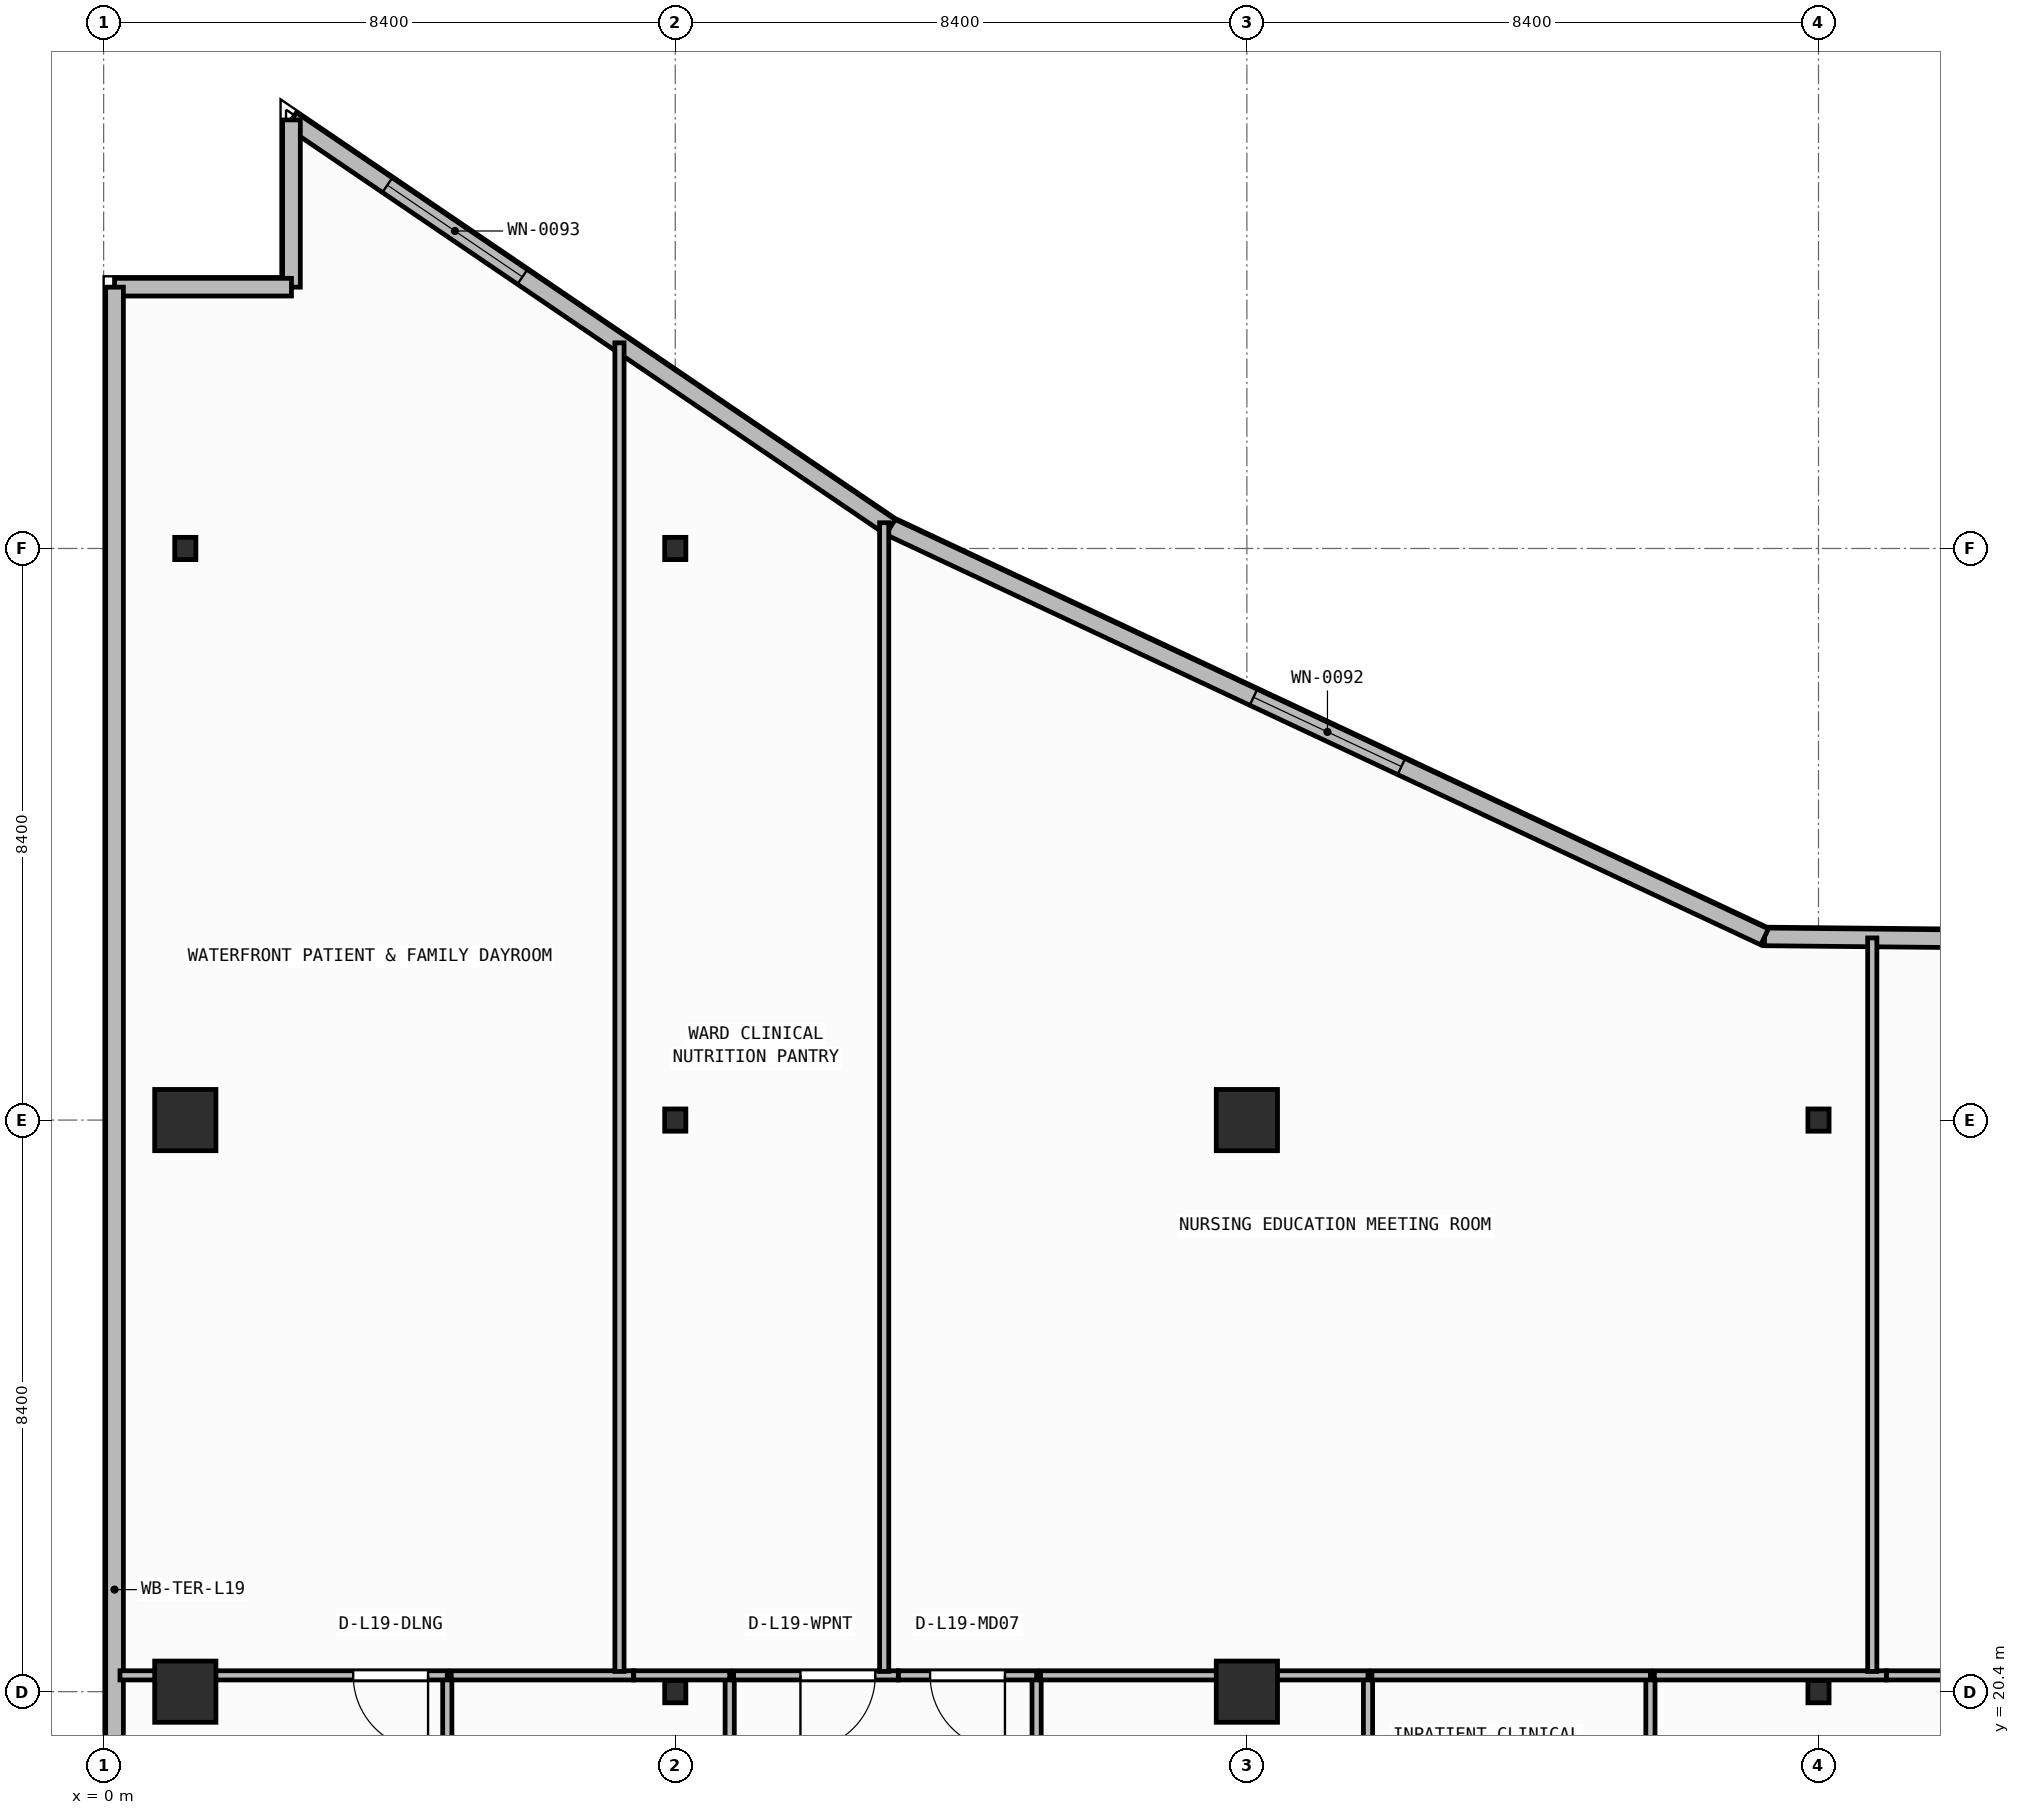
"""IFC4 building model, lengths in metres.
Left out: names, types, materials, properties, quantities, classifications, styles, units other than length and angle.
Written with IfcOpenShell. Run it as: python <this file> out.ifc"""

import sys

from ifc_helpers import new_model, si_unit, direction, frame, frame_2d, origin, origin_2d, place, context, subcontext, project, spatial, rectangle, i_section, extrude, element, fill, save


model = new_model("IFC4")
c1 = context("Model", 3, precision=1e-05, world=origin(), true_north=direction((0.0, 1.0)))
c2 = subcontext(c1, "Body", "Model", "MODEL_VIEW")
j1 = project(units=[si_unit("LENGTHUNIT", "METRE"), si_unit("PLANEANGLEUNIT", "RADIAN")], contexts=[c1])
p1 = place(None, origin())
s1 = spatial("IfcSite", under=j1, at=p1, CompositionType="ELEMENT")
p2 = place(p1, origin())
s2 = spatial("IfcBuilding", under=s1, at=p2, CompositionType="ELEMENT")
p3 = place(p2, frame((0.0, 0.0, 77.8)))
s3 = spatial("IfcBuildingStorey", under=s2, at=p3, CompositionType="ELEMENT", Elevation=77.8)
p4 = place(p3, frame((1.2, 20.4, 0.0), z_axis=(0.0, 0.0, 1.0), x_axis=(1.0, 0.0, 0.0)))
e1 = element("IfcColumn", 1, at=p4, inside=s3, PredefinedType="COLUMN", context=c2, shape_type="SweptSolid", body=[
    extrude(rectangle(XDim=0.9, YDim=0.9, at=origin_2d()), origin(), (0.0, 0.0, 1.0), 3.95),
])
p5 = place(p3, frame((8.4, 20.4, 0.0), z_axis=(0.0, 0.0, 1.0), x_axis=(1.0, 0.0, 0.0)))
e2 = element("IfcColumn", 2, at=p5, inside=s3, PredefinedType="COLUMN", context=c2, shape_type="SweptSolid", body=[
    extrude(i_section(OverallWidth=0.311, OverallDepth=0.327, WebThickness=0.016, FlangeThickness=0.025, FilletRadius=0.017, at=origin_2d()), origin(), (0.0, 0.0, 1.0), 3.95),
])
p6 = place(p3, frame((16.8, 20.4, 0.0), z_axis=(0.0, 0.0, 1.0), x_axis=(1.0, 0.0, 0.0)))
e3 = element("IfcColumn", 3, at=p6, inside=s3, PredefinedType="COLUMN", context=c2, shape_type="SweptSolid", body=[
    extrude(rectangle(XDim=0.9, YDim=0.9, at=origin_2d()), origin(), (0.0, 0.0, 1.0), 3.95),
])
p7 = place(p3, frame((25.2, 20.4, 0.0), z_axis=(0.0, 0.0, 1.0), x_axis=(1.0, 0.0, 0.0)))
e4 = element("IfcColumn", 4, at=p7, inside=s3, PredefinedType="COLUMN", context=c2, shape_type="SweptSolid", body=[
    extrude(i_section(OverallWidth=0.311, OverallDepth=0.327, WebThickness=0.016, FlangeThickness=0.025, FilletRadius=0.017, at=origin_2d()), origin(), (0.0, 0.0, 1.0), 3.95),
])
p8 = place(p3, frame((1.2, 28.8, 0.0), z_axis=(0.0, 0.0, 1.0), x_axis=(1.0, 0.0, 0.0)))
e5 = element("IfcColumn", 5, at=p8, inside=s3, PredefinedType="COLUMN", context=c2, shape_type="SweptSolid", body=[
    extrude(rectangle(XDim=0.9, YDim=0.9, at=origin_2d()), origin(), (0.0, 0.0, 1.0), 3.95),
])
p9 = place(p3, frame((8.4, 28.8, 0.0), z_axis=(0.0, 0.0, 1.0), x_axis=(1.0, 0.0, 0.0)))
e6 = element("IfcColumn", 6, at=p9, inside=s3, PredefinedType="COLUMN", context=c2, shape_type="SweptSolid", body=[
    extrude(i_section(OverallWidth=0.311, OverallDepth=0.327, WebThickness=0.016, FlangeThickness=0.025, FilletRadius=0.017, at=origin_2d()), origin(), (0.0, 0.0, 1.0), 3.95),
])
p10 = place(p3, frame((16.8, 28.8, 0.0), z_axis=(0.0, 0.0, 1.0), x_axis=(1.0, 0.0, 0.0)))
e7 = element("IfcColumn", 7, at=p10, inside=s3, PredefinedType="COLUMN", context=c2, shape_type="SweptSolid", body=[
    extrude(rectangle(XDim=0.9, YDim=0.9, at=origin_2d()), origin(), (0.0, 0.0, 1.0), 3.95),
])
for number, where, z_axis, x_axis in (
    (8, (25.2, 28.8, 0.0), (0.0, 0.0, 1.0), (1.0, 0.0, 0.0)),
    (9, (1.2, 37.2, 0.0), (0.0, 0.0, 1.0), (1.0, 0.0, 0.0)),
    (10, (8.4, 37.2, 0.0), (0.0, 0.0, 1.0), (1.0, 0.0, 0.0)),
):
    element("IfcColumn", number, at=place(p3, frame(where, z_axis=z_axis, x_axis=x_axis)), inside=s3, PredefinedType="COLUMN", context=c2, shape_type="SweptSolid", body=[
        extrude(i_section(OverallWidth=0.311, OverallDepth=0.327, WebThickness=0.016, FlangeThickness=0.025, FilletRadius=0.017, at=origin_2d()), origin(), (0.0, 0.0, 1.0), 3.95),
    ])
p11 = place(p3, frame((39.59, 31.344, 0.0), z_axis=(0.0, 0.0, 1.0), x_axis=(-0.999952362926, 0.009760731435, 0.0)))
e11 = element("IfcWall", 11, at=p11, inside=s3, PredefinedType="STANDARD", context=c2, shape_type="SweptSolid", body=[
    extrude(rectangle(XDim=15.183, YDim=0.26, at=frame_2d((7.591, 0.0))), origin(), (0.0, 0.0, 1.0), 3.71),
])
p12 = place(p11, frame((6.391, 0.0, 0.9)))
e12 = element("IfcOpeningElement", 12, at=p12, cuts=e11, PredefinedType="OPENING", context=c2, shape_type="SweptSolid", body=[
    extrude(rectangle(XDim=2.4, YDim=1.65, at=frame_2d((1.2, 0.825))), frame((0.0, 0.14, 0.0), z_axis=(0.0, -1.0, 0.0), x_axis=(1.0, 0.0, 0.0)), (0.0, 0.0, 1.0), 0.28),
])
p13 = place(p3, frame((24.408, 31.492, 0.0), z_axis=(0.0, 0.0, 1.0), x_axis=(-0.905396522918, 0.424566998585, 0.0)))
e13 = element("IfcWall", 13, at=p13, inside=s3, PredefinedType="STANDARD", context=c2, shape_type="SweptSolid", body=[
    extrude(rectangle(XDim=14.189, YDim=0.26, at=frame_2d((7.095, 0.0))), origin(), (0.0, 0.0, 1.0), 3.71),
])
p14 = place(p13, frame((5.895, 0.0, 0.9)))
e14 = element("IfcOpeningElement", 14, at=p14, cuts=e13, PredefinedType="OPENING", context=c2, shape_type="SweptSolid", body=[
    extrude(rectangle(XDim=2.4, YDim=1.65, at=frame_2d((1.2, 0.825))), frame((0.0, 0.14, 0.0), z_axis=(0.0, -1.0, 0.0), x_axis=(1.0, 0.0, 0.0)), (0.0, 0.0, 1.0), 0.28),
])
p15 = place(p3, frame((11.561, 37.517, 0.0), z_axis=(0.0, 0.0, 1.0), x_axis=(-0.827064743936, 0.562106670782, 0.0)))
e15 = element("IfcWall", 15, at=p15, inside=s3, PredefinedType="STANDARD", context=c2, shape_type="SweptSolid", body=[
    extrude(rectangle(XDim=10.641, YDim=0.26, at=frame_2d((5.32, 0.0))), origin(), (0.0, 0.0, 1.0), 3.71),
])
p16 = place(p15, frame((6.537, 0.0, 0.9)))
e16 = element("IfcOpeningElement", 16, at=p16, cuts=e15, PredefinedType="OPENING", context=c2, shape_type="SweptSolid", body=[
    extrude(rectangle(XDim=2.4, YDim=1.65, at=frame_2d((1.2, 0.825))), frame((0.0, 0.14, 0.0), z_axis=(0.0, -1.0, 0.0), x_axis=(1.0, 0.0, 0.0)), (0.0, 0.0, 1.0), 0.28),
])
p17 = place(p3, frame((2.76, 43.498, 0.0), z_axis=(0.0, 0.0, 1.0), x_axis=(0.0, -1.0, 0.0)))
e17 = element("IfcWall", 17, at=p17, inside=s3, PredefinedType="STANDARD", context=c2, shape_type="SweptSolid", body=[
    extrude(rectangle(XDim=2.458, YDim=0.26, at=frame_2d((1.229, 0.0))), origin(), (0.0, 0.0, 1.0), 3.71),
])
p18 = place(p3, frame((2.76, 41.04, 0.0), z_axis=(0.0, 0.0, 1.0), x_axis=(-1.0, 0.0, 0.0)))
e18 = element("IfcWall", 18, at=p18, inside=s3, PredefinedType="STANDARD", context=c2, shape_type="SweptSolid", body=[
    extrude(rectangle(XDim=2.6, YDim=0.26, at=frame_2d((1.3, 0.0))), origin(), (0.0, 0.0, 1.0), 3.71),
])
p19 = place(p3, frame((0.16, 41.04, 0.0), z_axis=(0.0, 0.0, 1.0), x_axis=(0.0, -1.0, 0.0)))
e19 = element("IfcWall", 19, at=p19, inside=s3, PredefinedType="STANDARD", context=c2, shape_type="SweptSolid", body=[
    extrude(rectangle(XDim=38.28, YDim=0.26, at=frame_2d((19.14, 0.0))), origin(), (0.0, 0.0, 1.0), 3.71),
])
p20 = place(p19, frame((30.187, 0.0, 0.0)))
e20 = element("IfcOpeningElement", 20, at=p20, cuts=e19, PredefinedType="OPENING", context=c2, shape_type="SweptSolid", body=[
    extrude(rectangle(XDim=1.3, YDim=2.15, at=frame_2d((0.65, 1.075))), frame((0.0, 0.14, 0.0), z_axis=(0.0, -1.0, 0.0), x_axis=(1.0, 0.0, 0.0)), (0.0, 0.0, 1.0), 0.28),
])
p21 = place(p3, frame((5.05, 17.14, 0.0), z_axis=(0.0, 0.0, 1.0), x_axis=(0.0, 1.0, 0.0)))
e21 = element("IfcWall", 21, at=p21, inside=s3, PredefinedType="PARTITIONING", context=c2, shape_type="SweptSolid", body=[
    extrude(rectangle(XDim=3.5, YDim=0.135, at=frame_2d((1.75, 0.0))), origin(), (0.0, 0.0, 1.0), 3.71),
])
p22 = place(p3, frame((5.05, 20.64, 0.0), z_axis=(0.0, 0.0, 1.0), x_axis=(-1.0, 0.0, 0.0)))
e22 = element("IfcWall", 22, at=p22, inside=s3, PredefinedType="PARTITIONING", context=c2, shape_type="SweptSolid", body=[
    extrude(rectangle(XDim=4.81, YDim=0.135, at=frame_2d((2.405, 0.0))), origin(), (0.0, 0.0, 1.0), 3.073),
])
p23 = place(p22, frame((0.283, 0.0, 0.0)))
e23 = element("IfcOpeningElement", 23, at=p23, cuts=e22, PredefinedType="OPENING", context=c2, shape_type="SweptSolid", body=[
    extrude(rectangle(XDim=1.1, YDim=2.1, at=frame_2d((0.55, 1.05))), frame((0.0, 0.077, 0.0), z_axis=(0.0, -1.0, 0.0), x_axis=(1.0, 0.0, 0.0)), (0.0, 0.0, 1.0), 0.155),
])
p24 = place(p3, frame((9.2, 17.833, 0.0), z_axis=(0.0, 0.0, 1.0), x_axis=(0.0, 1.0, 0.0)))
e24 = element("IfcWall", 24, at=p24, inside=s3, PredefinedType="PARTITIONING", context=c2, shape_type="SweptSolid", body=[
    extrude(rectangle(XDim=2.807, YDim=0.135, at=frame_2d((1.404, 0.0))), origin(), (0.0, 0.0, 1.0), 3.71),
])
p25 = place(p3, frame((7.788, 20.64, 0.0), z_axis=(0.0, 0.0, 1.0), x_axis=(-1.0, 0.0, 0.0)))
e25 = element("IfcWall", 25, at=p25, inside=s3, PredefinedType="PARTITIONING", context=c2, shape_type="SweptSolid", body=[
    extrude(rectangle(XDim=2.68, YDim=0.135, at=frame_2d((1.34, 0.0))), origin(), (0.0, 0.0, 1.0), 3.073),
])
p26 = place(p3, frame((9.2, 20.64, 0.0), z_axis=(0.0, 0.0, 1.0), x_axis=(-1.0, 0.0, 0.0)))
e26 = element("IfcWall", 26, at=p26, inside=s3, PredefinedType="PARTITIONING", context=c2, shape_type="SweptSolid", body=[
    extrude(rectangle(XDim=1.41, YDim=0.135, at=frame_2d((0.705, 0.0))), origin(), (0.0, 0.0, 1.0), 3.073),
])
p27 = place(p3, frame((13.71, 17.833, 0.0), z_axis=(0.0, 0.0, 1.0), x_axis=(0.0, 1.0, 0.0)))
e27 = element("IfcWall", 27, at=p27, inside=s3, PredefinedType="PARTITIONING", context=c2, shape_type="SweptSolid", body=[
    extrude(rectangle(XDim=2.807, YDim=0.135, at=frame_2d((1.404, 0.0))), origin(), (0.0, 0.0, 1.0), 3.71),
])
p28 = place(p3, frame((11.677, 20.64, 0.0), z_axis=(0.0, 0.0, 1.0), x_axis=(-1.0, 0.0, 0.0)))
e28 = element("IfcWall", 28, at=p28, inside=s3, PredefinedType="PARTITIONING", context=c2, shape_type="SweptSolid", body=[
    extrude(rectangle(XDim=2.42, YDim=0.135, at=frame_2d((1.21, 0.0))), origin(), (0.0, 0.0, 1.0), 3.073),
])
p29 = place(p28, frame((0.338, 0.0, 0.0)))
e29 = element("IfcOpeningElement", 29, at=p29, cuts=e28, PredefinedType="OPENING", context=c2, shape_type="SweptSolid", body=[
    extrude(rectangle(XDim=1.1, YDim=2.1, at=frame_2d((0.55, 1.05))), frame((0.0, 0.077, 0.0), z_axis=(0.0, -1.0, 0.0), x_axis=(1.0, 0.0, 0.0)), (0.0, 0.0, 1.0), 0.155),
])
p30 = place(p3, frame((13.71, 20.64, 0.0), z_axis=(0.0, 0.0, 1.0), x_axis=(-1.0, 0.0, 0.0)))
e30 = element("IfcWall", 30, at=p30, inside=s3, PredefinedType="PARTITIONING", context=c2, shape_type="SweptSolid", body=[
    extrude(rectangle(XDim=2.031, YDim=0.135, at=frame_2d((1.015, 0.0))), origin(), (0.0, 0.0, 1.0), 3.073),
])
p31 = place(p30, frame((0.465, 0.0, 0.0)))
e31 = element("IfcOpeningElement", 31, at=p31, cuts=e30, PredefinedType="OPENING", context=c2, shape_type="SweptSolid", body=[
    extrude(rectangle(XDim=1.1, YDim=2.1, at=frame_2d((0.55, 1.05))), frame((0.0, 0.077, 0.0), z_axis=(0.0, -1.0, 0.0), x_axis=(1.0, 0.0, 0.0)), (0.0, 0.0, 1.0), 0.155),
])
p32 = place(p3, frame((18.58, 17.833, 0.0), z_axis=(0.0, 0.0, 1.0), x_axis=(0.0, 1.0, 0.0)))
e32 = element("IfcWall", 32, at=p32, inside=s3, PredefinedType="PARTITIONING", context=c2, shape_type="SweptSolid", body=[
    extrude(rectangle(XDim=2.807, YDim=0.135, at=frame_2d((1.404, 0.0))), origin(), (0.0, 0.0, 1.0), 3.71),
])
p33 = place(p3, frame((18.58, 20.64, 0.0), z_axis=(0.0, 0.0, 1.0), x_axis=(-1.0, 0.0, 0.0)))
e33 = element("IfcWall", 33, at=p33, inside=s3, PredefinedType="PARTITIONING", context=c2, shape_type="SweptSolid", body=[
    extrude(rectangle(XDim=4.812, YDim=0.135, at=frame_2d((2.406, 0.0))), origin(), (0.0, 0.0, 1.0), 3.073),
])
p34 = place(p3, frame((22.73, 17.833, 0.0), z_axis=(0.0, 0.0, 1.0), x_axis=(0.0, 1.0, 0.0)))
e34 = element("IfcWall", 34, at=p34, inside=s3, PredefinedType="PARTITIONING", context=c2, shape_type="SweptSolid", body=[
    extrude(rectangle(XDim=2.807, YDim=0.135, at=frame_2d((1.404, 0.0))), origin(), (0.0, 0.0, 1.0), 3.71),
])
p35 = place(p3, frame((22.73, 20.64, 0.0), z_axis=(0.0, 0.0, 1.0), x_axis=(-1.0, 0.0, 0.0)))
e35 = element("IfcWall", 35, at=p35, inside=s3, PredefinedType="PARTITIONING", context=c2, shape_type="SweptSolid", body=[
    extrude(rectangle(XDim=4.093, YDim=0.135, at=frame_2d((2.046, 0.0))), origin(), (0.0, 0.0, 1.0), 3.073),
])
p36 = place(p3, frame((26.198, 20.64, 0.0), z_axis=(0.0, 0.0, 1.0), x_axis=(-1.0, 0.0, 0.0)))
e36 = element("IfcWall", 36, at=p36, inside=s3, PredefinedType="PARTITIONING", context=c2, shape_type="SweptSolid", body=[
    extrude(rectangle(XDim=3.41, YDim=0.135, at=frame_2d((1.705, 0.0))), origin(), (0.0, 0.0, 1.0), 3.073),
])
p37 = place(p3, frame((27.32, 20.64, 0.0), z_axis=(0.0, 0.0, 1.0), x_axis=(-1.0, 0.0, 0.0)))
e37 = element("IfcWall", 37, at=p37, inside=s3, PredefinedType="PARTITIONING", context=c2, shape_type="SweptSolid", body=[
    extrude(rectangle(XDim=1.121, YDim=0.135, at=frame_2d((0.56, 0.0))), origin(), (0.0, 0.0, 1.0), 3.073),
])
p38 = place(p3, frame((7.58, 20.698, 0.0), z_axis=(0.0, 0.0, 1.0), x_axis=(0.0, 1.0, 0.0)))
e38 = element("IfcWall", 38, at=p38, inside=s3, PredefinedType="PARTITIONING", context=c2, shape_type="SweptSolid", body=[
    extrude(rectangle(XDim=19.524, YDim=0.135, at=frame_2d((9.762, 0.0))), origin(), (0.0, 0.0, 1.0), 3.71),
])
p39 = place(p3, frame((11.47, 20.698, 0.0), z_axis=(0.0, 0.0, 1.0), x_axis=(0.0, 1.0, 0.0)))
e39 = element("IfcWall", 39, at=p39, inside=s3, PredefinedType="PARTITIONING", context=c2, shape_type="SweptSolid", body=[
    extrude(rectangle(XDim=16.881, YDim=0.135, at=frame_2d((8.44, 0.0))), origin(), (0.0, 0.0, 1.0), 3.71),
])
p40 = place(p3, frame((25.99, 20.698, 0.0), z_axis=(0.0, 0.0, 1.0), x_axis=(0.0, 1.0, 0.0)))
e40 = element("IfcWall", 40, at=p40, inside=s3, PredefinedType="PARTITIONING", context=c2, shape_type="SweptSolid", body=[
    extrude(rectangle(XDim=10.779, YDim=0.135, at=frame_2d((5.39, 0.0))), origin(), (0.0, 0.0, 1.0), 3.71),
])
p41 = place(p14, origin())
e41 = element("IfcWindow", 41, at=p41, inside=s3, PartitioningType="SINGLE_PANEL", PredefinedType="WINDOW", context=c2, shape_type="SweptSolid", body=[
    extrude(rectangle(XDim=2.4, YDim=1.65, at=frame_2d((1.2, 0.825))), frame((0.0, 0.03, 0.0), z_axis=(0.0, -1.0, 0.0), x_axis=(1.0, 0.0, 0.0)), (0.0, 0.0, 1.0), 0.06),
])
fill(e14, e41)
p42 = place(p16, origin())
e42 = element("IfcWindow", 42, at=p42, inside=s3, PartitioningType="SINGLE_PANEL", PredefinedType="WINDOW", context=c2, shape_type="SweptSolid", body=[
    extrude(rectangle(XDim=2.4, YDim=1.65, at=frame_2d((1.2, 0.825))), frame((0.0, 0.03, 0.0), z_axis=(0.0, -1.0, 0.0), x_axis=(1.0, 0.0, 0.0)), (0.0, 0.0, 1.0), 0.06),
])
fill(e16, e42)
p43 = place(p23, origin())
e43 = element("IfcDoor", 43, at=p43, inside=s3, OperationType="SINGLE_SWING_LEFT", PredefinedType="DOOR", context=c2, shape_type="SweptSolid", body=[
    extrude(rectangle(XDim=1.1, YDim=2.1, at=frame_2d((0.55, 1.05))), frame((0.0, 0.025, 0.0), z_axis=(0.0, -1.0, 0.0), x_axis=(1.0, 0.0, 0.0)), (0.0, 0.0, 1.0), 0.05),
])
fill(e23, e43)
p44 = place(p29, origin())
e44 = element("IfcDoor", 44, at=p44, inside=s3, OperationType="SINGLE_SWING_RIGHT", PredefinedType="DOOR", context=c2, shape_type="SweptSolid", body=[
    extrude(rectangle(XDim=1.1, YDim=2.1, at=frame_2d((0.55, 1.05))), frame((0.0, 0.025, 0.0), z_axis=(0.0, -1.0, 0.0), x_axis=(1.0, 0.0, 0.0)), (0.0, 0.0, 1.0), 0.05),
])
fill(e29, e44)
p45 = place(p31, origin())
e45 = element("IfcDoor", 45, at=p45, inside=s3, OperationType="SINGLE_SWING_LEFT", PredefinedType="DOOR", context=c2, shape_type="SweptSolid", body=[
    extrude(rectangle(XDim=1.1, YDim=2.1, at=frame_2d((0.55, 1.05))), frame((0.0, 0.025, 0.0), z_axis=(0.0, -1.0, 0.0), x_axis=(1.0, 0.0, 0.0)), (0.0, 0.0, 1.0), 0.05),
])
fill(e31, e45)
save(model, sys.argv[1])
